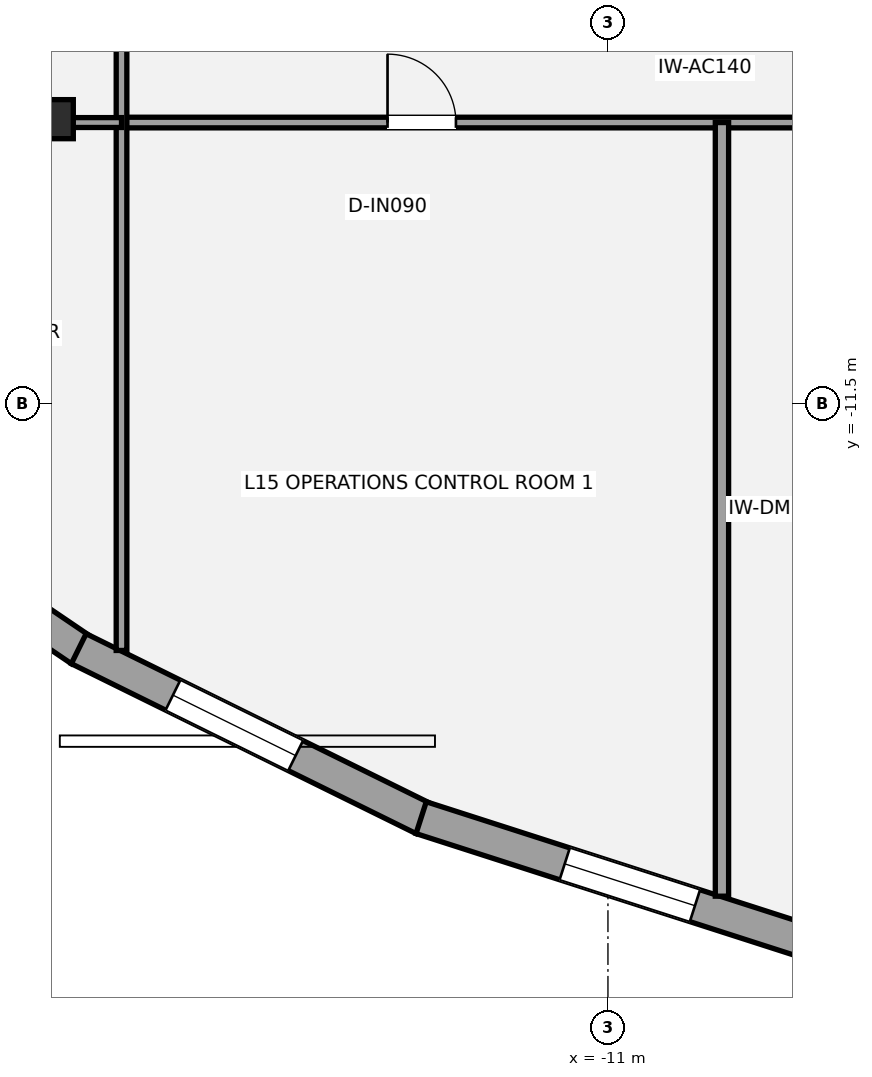
"""IFC4 building model, lengths in metres.
Left out: names, types, materials, properties, quantities, classifications, styles, units other than length and angle.
Written with IfcOpenShell. Run it as: python <this file> out.ifc"""

import sys

from ifc_helpers import new_model, si_unit, direction, frame, frame_2d, origin, origin_2d, place, context, subcontext, project, spatial, rectangle, i_section, extrude, element, fill, save


model = new_model("IFC4")
c1 = context("Model", 3, precision=1e-05, world=origin(), true_north=direction((0.0, 1.0)))
c2 = subcontext(c1, "Body", "Model", "MODEL_VIEW")
j1 = project(units=[si_unit("LENGTHUNIT", "METRE"), si_unit("PLANEANGLEUNIT", "RADIAN")], contexts=[c1])
p1 = place(None, origin())
s1 = spatial("IfcSite", under=j1, at=p1, CompositionType="ELEMENT")
p2 = place(p1, origin())
s2 = spatial("IfcBuilding", under=s1, at=p2, CompositionType="ELEMENT")
p3 = place(p2, frame((0.0, 0.0, 59.4)))
s3 = spatial("IfcBuildingStorey", under=s2, at=p3, CompositionType="ELEMENT", Elevation=59.4)
p4 = place(p3, frame((-18.253, -7.756, 0.0), z_axis=(0.0, 0.0, 1.0), x_axis=(1.0, 0.0, 0.0)))
e1 = element("IfcColumn", 1, at=p4, inside=s3, PredefinedType="COLUMN", context=c2, shape_type="SweptSolid", body=[
    extrude(i_section(OverallWidth=0.437, OverallDepth=0.514, WebThickness=0.061, FlangeThickness=0.097, at=origin_2d()), origin(), (0.0, 0.0, 1.0), 3.6),
])
p5 = place(p3, frame((-17.937, -14.737, 0.0), z_axis=(0.0, 0.0, 1.0), x_axis=(-0.827723816917, 0.561135708103, 0.0)))
e2 = element("IfcWall", 2, at=p5, inside=s3, PredefinedType="STANDARD", context=c2, shape_type="SweptSolid", body=[
    extrude(rectangle(XDim=4.768, YDim=0.44, at=frame_2d((2.384, 0.0))), origin(), (0.0, 0.0, 1.0), 2.529),
])
p6 = place(p5, frame((1.138, 0.0, 0.65)))
e3 = element("IfcOpeningElement", 3, at=p6, cuts=e2, PredefinedType="OPENING", context=c2, shape_type="SweptSolid", body=[
    extrude(rectangle(XDim=1.8, YDim=1.7, at=frame_2d((0.9, 0.85))), frame((0.0, 0.23, 0.0), z_axis=(0.0, -1.0, 0.0), x_axis=(1.0, 0.0, 0.0)), (0.0, 0.0, 1.0), 0.46),
])
p7 = place(p3, frame((-13.428, -16.958, 0.0), z_axis=(0.0, 0.0, 1.0), x_axis=(-0.896962161347, 0.442107318545, 0.0)))
e4 = element("IfcWall", 4, at=p7, inside=s3, PredefinedType="STANDARD", context=c2, shape_type="SweptSolid", body=[
    extrude(rectangle(XDim=5.056, YDim=0.44, at=frame_2d((2.528, 0.0))), origin(), (0.0, 0.0, 1.0), 2.529),
])
p8 = place(p7, frame((1.874, 0.0, 0.65)))
e5 = element("IfcOpeningElement", 5, at=p8, cuts=e4, PredefinedType="OPENING", context=c2, shape_type="SweptSolid", body=[
    extrude(rectangle(XDim=1.8, YDim=1.7, at=frame_2d((0.9, 0.85))), frame((0.0, 0.23, 0.0), z_axis=(0.0, -1.0, 0.0), x_axis=(1.0, 0.0, 0.0)), (0.0, 0.0, 1.0), 0.46),
])
p9 = place(p3, frame((-8.344, -18.589, 0.0), z_axis=(0.0, 0.0, 1.0), x_axis=(-0.95202383213, 0.30602389295, 0.0)))
e6 = element("IfcWall", 6, at=p9, inside=s3, PredefinedType="STANDARD", context=c2, shape_type="SweptSolid", body=[
    extrude(rectangle(XDim=5.372, YDim=0.44, at=frame_2d((2.686, 0.0))), origin(), (0.0, 0.0, 1.0), 2.529),
])
p10 = place(p9, frame((1.587, 0.0, 0.65)))
e7 = element("IfcOpeningElement", 7, at=p10, cuts=e6, PredefinedType="OPENING", context=c2, shape_type="SweptSolid", body=[
    extrude(rectangle(XDim=1.8, YDim=1.7, at=frame_2d((0.9, 0.85))), frame((0.0, 0.23, 0.0), z_axis=(0.0, -1.0, 0.0), x_axis=(1.0, 0.0, 0.0)), (0.0, 0.0, 1.0), 0.46),
])
p11 = place(p3, frame((-17.4, -7.8, 0.0), z_axis=(0.0, 0.0, 1.0), x_axis=(1.0, 0.0, 0.0)))
e8 = element("IfcWall", 8, at=p11, inside=s3, PredefinedType="PARTITIONING", context=c2, shape_type="SweptSolid", body=[
    extrude(rectangle(XDim=34.8, YDim=0.14, at=frame_2d((17.4, 0.0))), origin(), (0.0, 0.0, 1.0), 2.779),
])
p12 = place(p11, frame((3.5, 0.0, 0.0)))
e9 = element("IfcOpeningElement", 9, at=p12, cuts=e8, PredefinedType="OPENING", context=c2, shape_type="SweptSolid", body=[
    extrude(rectangle(XDim=0.9, YDim=2.1, at=frame_2d((0.45, 1.05))), frame((0.0, 0.08, 0.0), z_axis=(0.0, -1.0, 0.0), x_axis=(1.0, 0.0, 0.0)), (0.0, 0.0, 1.0), 0.16),
])
p13 = place(p11, frame((10.95, 0.0, 0.0)))
e10 = element("IfcOpeningElement", 10, at=p13, cuts=e8, PredefinedType="OPENING", context=c2, shape_type="SweptSolid", body=[
    extrude(rectangle(XDim=0.9, YDim=2.1, at=frame_2d((0.45, 1.05))), frame((0.0, 0.08, 0.0), z_axis=(0.0, -1.0, 0.0), x_axis=(1.0, 0.0, 0.0)), (0.0, 0.0, 1.0), 0.16),
])
p14 = place(p11, frame((17.95, 0.0, 0.0)))
e11 = element("IfcOpeningElement", 11, at=p14, cuts=e8, PredefinedType="OPENING", context=c2, shape_type="SweptSolid", body=[
    extrude(rectangle(XDim=0.9, YDim=2.1, at=frame_2d((0.45, 1.05))), frame((0.0, 0.08, 0.0), z_axis=(0.0, -1.0, 0.0), x_axis=(1.0, 0.0, 0.0)), (0.0, 0.0, 1.0), 0.16),
])
p15 = place(p11, frame((24.45, 0.0, 0.0)))
e12 = element("IfcOpeningElement", 12, at=p15, cuts=e8, PredefinedType="OPENING", context=c2, shape_type="SweptSolid", body=[
    extrude(rectangle(XDim=0.9, YDim=2.1, at=frame_2d((0.45, 1.05))), frame((0.0, 0.08, 0.0), z_axis=(0.0, -1.0, 0.0), x_axis=(1.0, 0.0, 0.0)), (0.0, 0.0, 1.0), 0.16),
])
p16 = place(p11, frame((30.9, 0.0, 0.0)))
e13 = element("IfcOpeningElement", 13, at=p16, cuts=e8, PredefinedType="OPENING", context=c2, shape_type="SweptSolid", body=[
    extrude(rectangle(XDim=0.9, YDim=2.1, at=frame_2d((0.45, 1.05))), frame((0.0, 0.08, 0.0), z_axis=(0.0, -1.0, 0.0), x_axis=(1.0, 0.0, 0.0)), (0.0, 0.0, 1.0), 0.16),
])
p17 = place(p3, frame((-17.4, -14.745, 0.0), z_axis=(0.0, 0.0, 1.0), x_axis=(0.0, 1.0, 0.0)))
e14 = element("IfcWall", 14, at=p17, inside=s3, PredefinedType="PARTITIONING", context=c2, shape_type="SweptSolid", body=[
    extrude(rectangle(XDim=20.595, YDim=0.14, at=frame_2d((10.298, 0.0))), origin(), (0.0, 0.0, 1.0), 2.841),
])
p18 = place(p17, frame((9.895, 0.0, 0.0)))
e15 = element("IfcOpeningElement", 15, at=p18, cuts=e14, PredefinedType="OPENING", context=c2, shape_type="SweptSolid", body=[
    extrude(rectangle(XDim=0.9, YDim=2.1, at=frame_2d((0.45, 1.05))), frame((0.0, 0.08, 0.0), z_axis=(0.0, -1.0, 0.0), x_axis=(1.0, 0.0, 0.0)), (0.0, 0.0, 1.0), 0.16),
])
p19 = place(p17, frame((16.72, 0.0, 0.0)))
e16 = element("IfcOpeningElement", 16, at=p19, cuts=e14, PredefinedType="OPENING", context=c2, shape_type="SweptSolid", body=[
    extrude(rectangle(XDim=0.9, YDim=2.1, at=frame_2d((0.45, 1.05))), frame((0.0, 0.08, 0.0), z_axis=(0.0, -1.0, 0.0), x_axis=(1.0, 0.0, 0.0)), (0.0, 0.0, 1.0), 0.16),
])
p20 = place(p3, frame((-9.5, -17.978, 0.0), z_axis=(0.0, 0.0, 1.0), x_axis=(0.0, 1.0, 0.0)))
e17 = element("IfcWall", 17, at=p20, inside=s3, PredefinedType="PARTITIONING", context=c2, shape_type="SweptSolid", body=[
    extrude(rectangle(XDim=10.178, YDim=0.175, at=frame_2d((5.089, 0.0))), origin(), (0.0, 0.0, 1.0), 2.853),
])
p21 = place(p3, frame((-25.714, -7.8, 0.0), z_axis=(0.0, 0.0, 1.0), x_axis=(1.0, 0.0, 0.0)))
e18 = element("IfcWall", 18, at=p21, inside=s3, PredefinedType="PARTITIONING", context=c2, shape_type="SweptSolid", body=[
    extrude(rectangle(XDim=8.314, YDim=0.13, at=frame_2d((4.157, 0.0))), origin(), (0.0, 0.0, 1.0), 2.779),
])
p22 = place(p21, frame((0.63, 0.0, 0.0)))
e19 = element("IfcOpeningElement", 19, at=p22, cuts=e18, PredefinedType="OPENING", context=c2, shape_type="SweptSolid", body=[
    extrude(rectangle(XDim=0.9, YDim=2.1, at=frame_2d((0.45, 1.05))), frame((0.0, 0.075, 0.0), z_axis=(0.0, -1.0, 0.0), x_axis=(1.0, 0.0, 0.0)), (0.0, 0.0, 1.0), 0.15),
])
p23 = place(p8, origin())
e20 = element("IfcWindow", 20, at=p23, inside=s3, PartitioningType="SINGLE_PANEL", PredefinedType="WINDOW", context=c2, shape_type="SweptSolid", body=[
    extrude(rectangle(XDim=1.8, YDim=1.7, at=frame_2d((0.9, 0.85))), frame((0.0, -0.01, 0.0), z_axis=(0.0, -1.0, 0.0), x_axis=(1.0, 0.0, 0.0)), (0.0, 0.0, 1.0), 0.06),
])
fill(e5, e20)
p24 = place(p10, origin())
e21 = element("IfcWindow", 21, at=p24, inside=s3, PartitioningType="SINGLE_PANEL", PredefinedType="WINDOW", context=c2, shape_type="SweptSolid", body=[
    extrude(rectangle(XDim=1.8, YDim=1.7, at=frame_2d((0.9, 0.85))), frame((0.0, -0.01, 0.0), z_axis=(0.0, -1.0, 0.0), x_axis=(1.0, 0.0, 0.0)), (0.0, 0.0, 1.0), 0.06),
])
fill(e7, e21)
p25 = place(p12, origin())
e22 = element("IfcDoor", 22, at=p25, inside=s3, OperationType="SINGLE_SWING_LEFT", PredefinedType="DOOR", context=c2, shape_type="SweptSolid", body=[
    extrude(rectangle(XDim=0.9, YDim=2.1, at=frame_2d((0.45, 1.05))), frame((0.0, 0.025, 0.0), z_axis=(0.0, -1.0, 0.0), x_axis=(1.0, 0.0, 0.0)), (0.0, 0.0, 1.0), 0.05),
])
fill(e9, e22)
save(model, sys.argv[1])
